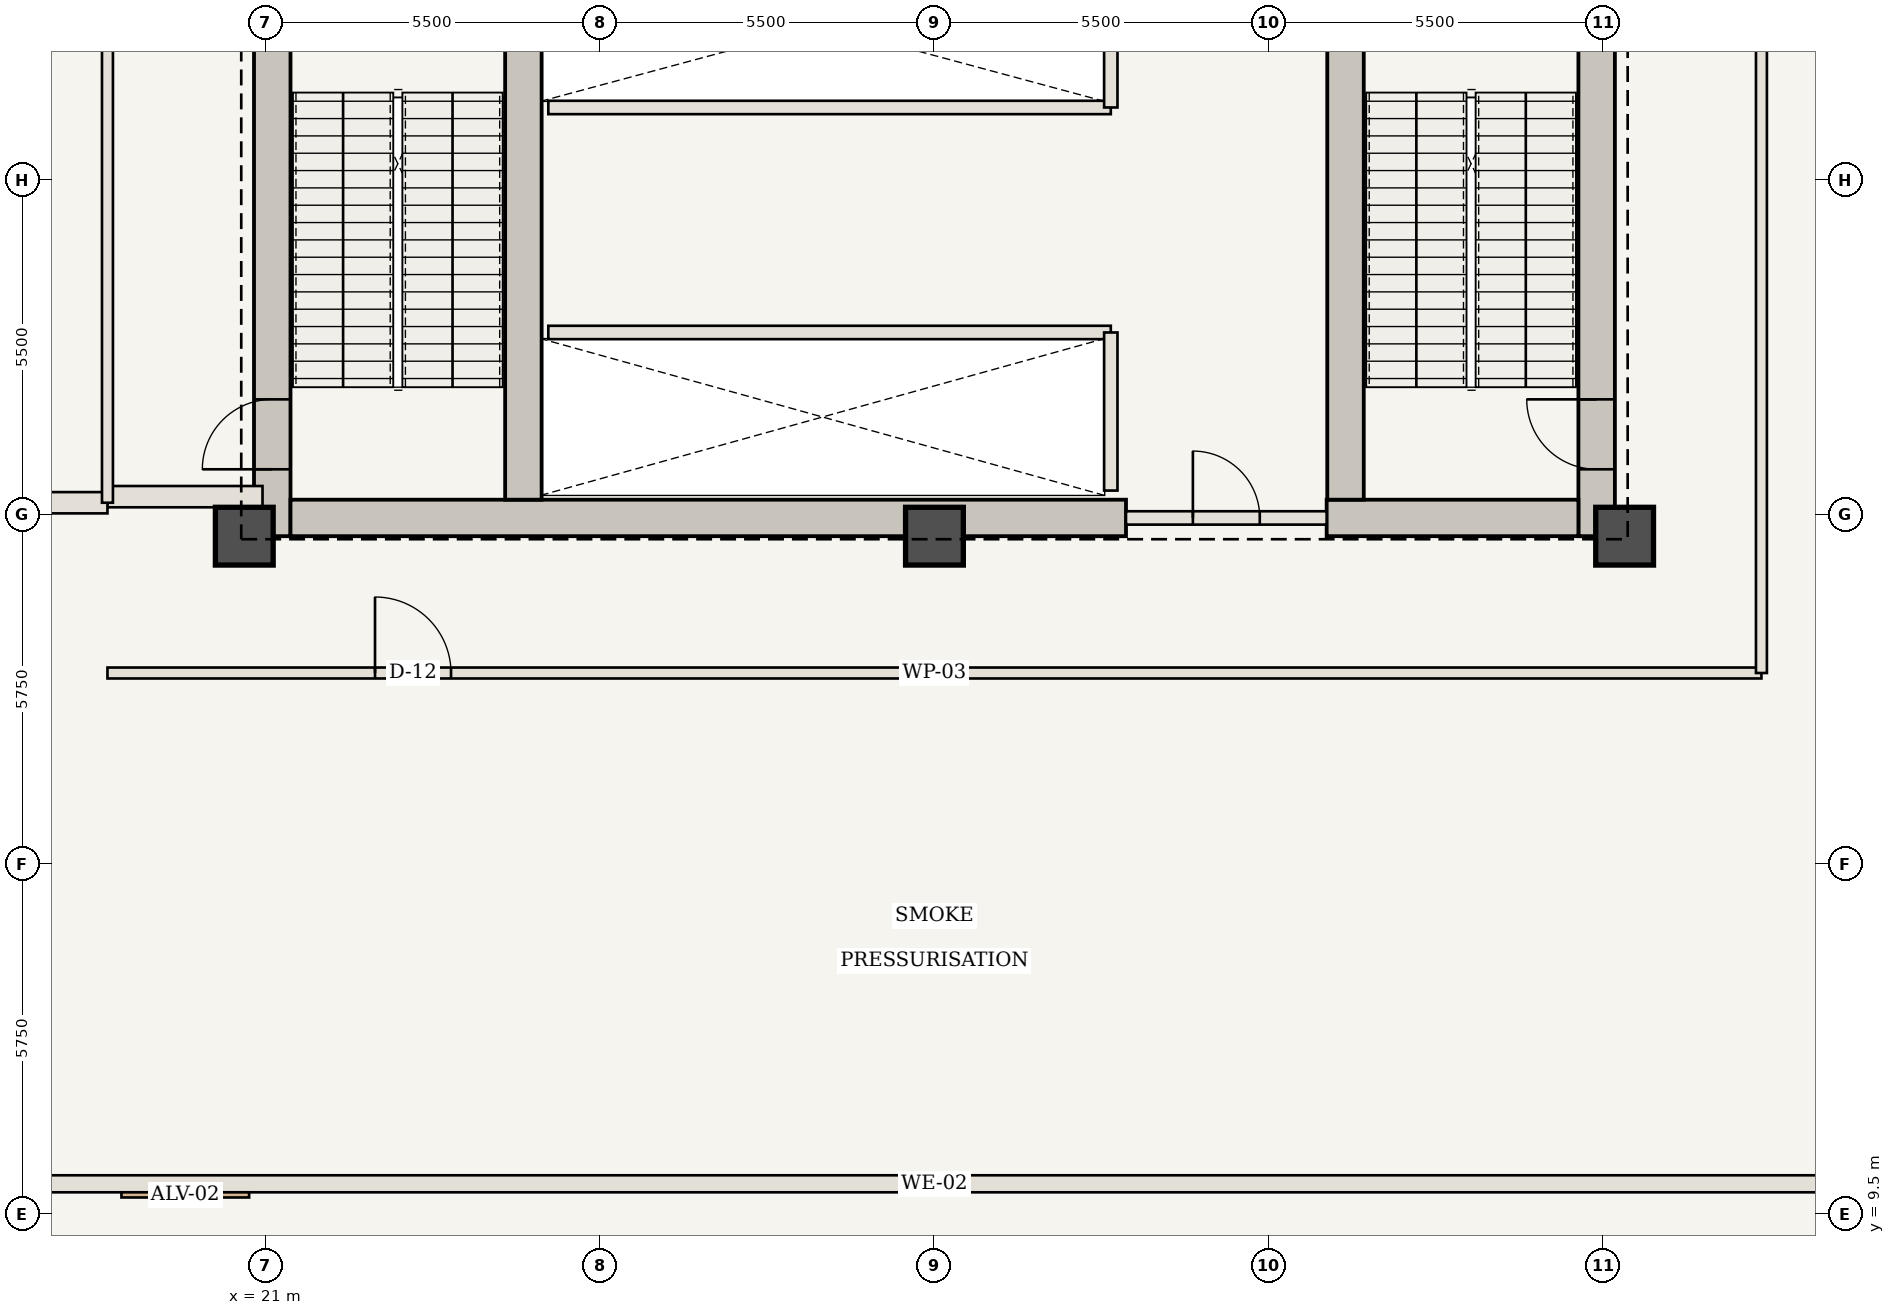
"""IFC4 building model, lengths in metres.
Left out: names, types, materials, properties, quantities, classifications, styles, units other than length and angle.
Written with IfcOpenShell. Run it as: python <this file> out.ifc"""

import sys

from ifc_helpers import new_model, si_unit, direction, frame, frame_2d, origin, origin_2d, place, context, subcontext, project, spatial, rectangle, extrude, element, fill, save


model = new_model("IFC4")
c1 = context("Model", 3, precision=1e-05, world=origin(), true_north=direction((0.0, 1.0)))
c2 = subcontext(c1, "Body", "Model", "MODEL_VIEW")
j1 = project(units=[si_unit("LENGTHUNIT", "METRE"), si_unit("PLANEANGLEUNIT", "RADIAN")], contexts=[c1])
p1 = place(None, origin())
s1 = spatial("IfcSite", under=j1, at=p1, CompositionType="ELEMENT")
p2 = place(p1, origin())
s2 = spatial("IfcBuilding", under=s1, at=p2, CompositionType="ELEMENT")
p3 = place(p2, frame((0.0, 0.0, 176.05)))
s3 = spatial("IfcBuildingStorey", under=s2, at=p3, CompositionType="ELEMENT", Elevation=176.05)
p4 = place(p3, frame((21.11, 20.65, 0.0), z_axis=(0.0, 0.0, 1.0), x_axis=(0.0, 1.0, 0.0)))
e1 = element("IfcWall", 1, at=p4, inside=s3, PredefinedType="SHEAR", context=c2, shape_type="SweptSolid", body=[
    extrude(rectangle(XDim=9.95, YDim=0.6, at=frame_2d((4.975, 0.0))), origin(), (0.0, 0.0, 1.0), 6.3),
])
p5 = place(p4, frame((1.1, 0.0, 0.0)))
e2 = element("IfcOpeningElement", 2, at=p5, cuts=e1, PredefinedType="OPENING", context=c2, shape_type="SweptSolid", body=[
    extrude(rectangle(XDim=1.15, YDim=2.15, at=frame_2d((0.575, 1.075))), frame((0.0, 0.31, 0.0), z_axis=(0.0, -1.0, 0.0), x_axis=(1.0, 0.0, 0.0)), (0.0, 0.0, 1.0), 0.62),
])
p6 = place(p3, frame((42.89, 20.65, 0.0), z_axis=(0.0, 0.0, 1.0), x_axis=(0.0, 1.0, 0.0)))
e3 = element("IfcWall", 3, at=p6, inside=s3, PredefinedType="SHEAR", context=c2, shape_type="SweptSolid", body=[
    extrude(rectangle(XDim=9.95, YDim=0.6, at=frame_2d((4.975, 0.0))), origin(), (0.0, 0.0, 1.0), 6.3),
])
p7 = place(p6, frame((1.1, 0.0, 0.0)))
e4 = element("IfcOpeningElement", 4, at=p7, cuts=e3, PredefinedType="OPENING", context=c2, shape_type="SweptSolid", body=[
    extrude(rectangle(XDim=1.15, YDim=2.15, at=frame_2d((0.575, 1.075))), frame((0.0, 0.31, 0.0), z_axis=(0.0, -1.0, 0.0), x_axis=(1.0, 0.0, 0.0)), (0.0, 0.0, 1.0), 0.62),
])
p8 = place(p3, frame((21.41, 20.95, 0.0), z_axis=(0.0, 0.0, 1.0), x_axis=(1.0, 0.0, 0.0)))
e5 = element("IfcWall", 5, at=p8, inside=s3, PredefinedType="SHEAR", context=c2, shape_type="SweptSolid", body=[
    extrude(rectangle(XDim=13.74, YDim=0.6, at=frame_2d((6.87, 0.0))), origin(), (0.0, 0.0, 1.0), 6.3),
])
p9 = place(p3, frame((38.45, 20.95, 0.0), z_axis=(0.0, 0.0, 1.0), x_axis=(1.0, 0.0, 0.0)))
e6 = element("IfcWall", 6, at=p9, inside=s3, PredefinedType="SHEAR", context=c2, shape_type="SweptSolid", body=[
    extrude(rectangle(XDim=4.14, YDim=0.6, at=frame_2d((2.07, 0.0))), origin(), (0.0, 0.0, 1.0), 6.3),
])
for number, where, z_axis, x_axis in (
    (7, (25.24, 21.25, 0.0), (0.0, 0.0, 1.0), (0.0, 1.0, 0.0)),
    (8, (38.76, 21.25, 0.0), (0.0, 0.0, 1.0), (0.0, 1.0, 0.0)),
):
    element("IfcWall", number, at=place(p3, frame(where, z_axis=z_axis, x_axis=x_axis)), inside=s3, PredefinedType="SHEAR", context=c2, shape_type="SweptSolid", body=[
        extrude(rectangle(XDim=9.35, YDim=0.6, at=frame_2d((4.675, 0.0))), origin(), (0.0, 0.0, 1.0), 6.3),
    ])
for number, where, z_axis, x_axis in (
    (9, (20.65, 20.65, 0.0), (0.0, 0.0, 1.0), (1.0, 0.0, 0.0)),
    (10, (32.0, 20.65, 0.0), (0.0, 0.0, 1.0), (1.0, 0.0, 0.0)),
    (11, (43.35, 20.65, 0.0), (0.0, 0.0, 1.0), (1.0, 0.0, 0.0)),
):
    element("IfcColumn", number, at=place(p3, frame(where, z_axis=z_axis, x_axis=x_axis)), inside=s3, PredefinedType="COLUMN", context=c2, shape_type="SweptSolid", body=[
        extrude(rectangle(XDim=0.95, YDim=0.95, at=origin_2d()), origin(), (0.0, 0.0, 1.0), 5.88),
    ])
p10 = place(p3, frame((35.15, 20.95, 0.0), z_axis=(0.0, 0.0, 1.0), x_axis=(1.0, 0.0, 0.0)))
e12 = element("IfcWall", 12, at=p10, inside=s3, PredefinedType="STANDARD", context=c2, shape_type="SweptSolid", body=[
    extrude(rectangle(XDim=3.3, YDim=0.22, at=frame_2d((1.65, 0.0))), origin(), (0.0, 0.0, 1.0), 5.88),
])
p11 = place(p10, frame((1.1, 0.0, 0.0)))
e13 = element("IfcOpeningElement", 13, at=p11, cuts=e12, PredefinedType="OPENING", context=c2, shape_type="SweptSolid", body=[
    extrude(rectangle(XDim=1.1, YDim=2.15, at=frame_2d((0.55, 1.075))), frame((0.0, 0.12, 0.0), z_axis=(0.0, -1.0, 0.0), x_axis=(1.0, 0.0, 0.0)), (0.0, 0.0, 1.0), 0.24),
])
p12 = place(p3, frame((25.65, 24.0, 0.0), z_axis=(0.0, 0.0, 1.0), x_axis=(1.0, 0.0, 0.0)))
e14 = element("IfcWall", 14, at=p12, inside=s3, PredefinedType="STANDARD", context=c2, shape_type="SweptSolid", body=[
    extrude(rectangle(XDim=9.25, YDim=0.22, at=frame_2d((4.625, 0.0))), origin(), (0.0, 0.0, 1.0), 5.88),
])
p13 = place(p3, frame((34.9, 21.4, 0.0), z_axis=(0.0, 0.0, 1.0), x_axis=(0.0, 1.0, 0.0)))
e15 = element("IfcWall", 15, at=p13, inside=s3, PredefinedType="STANDARD", context=c2, shape_type="SweptSolid", body=[
    extrude(rectangle(XDim=2.6, YDim=0.22, at=frame_2d((1.3, 0.0))), origin(), (0.0, 0.0, 1.0), 5.88),
])
p14 = place(p3, frame((25.65, 27.7, 0.0), z_axis=(0.0, 0.0, 1.0), x_axis=(1.0, 0.0, 0.0)))
e16 = element("IfcWall", 16, at=p14, inside=s3, PredefinedType="STANDARD", context=c2, shape_type="SweptSolid", body=[
    extrude(rectangle(XDim=9.25, YDim=0.22, at=frame_2d((4.625, 0.0))), origin(), (0.0, 0.0, 1.0), 5.88),
])
p15 = place(p3, frame((34.9, 27.7, 0.0), z_axis=(0.0, 0.0, 1.0), x_axis=(0.0, 1.0, 0.0)))
e17 = element("IfcWall", 17, at=p15, inside=s3, PredefinedType="STANDARD", context=c2, shape_type="SweptSolid", body=[
    extrude(rectangle(XDim=2.7, YDim=0.22, at=frame_2d((1.35, 0.0))), origin(), (0.0, 0.0, 1.0), 5.88),
])
p16 = place(p3, frame((18.4, 21.3, 0.0), z_axis=(0.0, 0.0, 1.0), x_axis=(1.0, 0.0, 0.0)))
e18 = element("IfcWall", 18, at=p16, inside=s3, PredefinedType="STANDARD", context=c2, shape_type="SweptSolid", body=[
    extrude(rectangle(XDim=2.55, YDim=0.35, at=frame_2d((1.275, 0.0))), origin(), (0.0, 0.0, 1.0), 3.908),
])
p17 = place(p3, frame((18.4, 18.4, 0.0), z_axis=(0.0, 0.0, 1.0), x_axis=(1.0, 0.0, 0.0)))
e19 = element("IfcWall", 19, at=p17, inside=s3, PredefinedType="STANDARD", context=c2, shape_type="SweptSolid", body=[
    extrude(rectangle(XDim=27.2, YDim=0.18, at=frame_2d((13.6, 0.0))), origin(), (0.0, 0.0, 1.0), 5.88),
])
p18 = place(p17, frame((4.4, 0.0, 0.0)))
e20 = element("IfcOpeningElement", 20, at=p18, cuts=e19, PredefinedType="OPENING", context=c2, shape_type="SweptSolid", body=[
    extrude(rectangle(XDim=1.25, YDim=2.2, at=frame_2d((0.625, 1.1))), frame((0.0, 0.1, 0.0), z_axis=(0.0, -1.0, 0.0), x_axis=(1.0, 0.0, 0.0)), (0.0, 0.0, 1.0), 0.2),
])
p19 = place(p3, frame((10.05, 21.2, 0.0), z_axis=(0.0, 0.0, 1.0), x_axis=(1.0, 0.0, 0.0)))
e21 = element("IfcWall", 21, at=p19, inside=s3, PredefinedType="STANDARD", context=c2, shape_type="SweptSolid", body=[
    extrude(rectangle(XDim=8.35, YDim=0.35, at=frame_2d((4.175, 0.0))), origin(), (0.0, 0.0, 1.0), 3.908),
])
p20 = place(p3, frame((18.4, 21.2, 0.0), z_axis=(0.0, 0.0, 1.0), x_axis=(0.0, 1.0, 0.0)))
e22 = element("IfcWall", 22, at=p20, inside=s3, PredefinedType="STANDARD", context=c2, shape_type="SweptSolid", body=[
    extrude(rectangle(XDim=21.6, YDim=0.18, at=frame_2d((10.8, 0.0))), origin(), (0.0, 0.0, 1.0), 5.88),
])
p21 = place(p20, frame((11.75, 0.0, 0.0)))
e23 = element("IfcOpeningElement", 23, at=p21, cuts=e22, PredefinedType="OPENING", context=c2, shape_type="SweptSolid", body=[
    extrude(rectangle(XDim=1.1, YDim=2.15, at=frame_2d((0.55, 1.075))), frame((0.0, 0.1, 0.0), z_axis=(0.0, -1.0, 0.0), x_axis=(1.0, 0.0, 0.0)), (0.0, 0.0, 1.0), 0.2),
])
p22 = place(p3, frame((45.6, 18.4, 0.0), z_axis=(0.0, 0.0, 1.0), x_axis=(0.0, 1.0, 0.0)))
e24 = element("IfcWall", 24, at=p22, inside=s3, PredefinedType="STANDARD", context=c2, shape_type="SweptSolid", body=[
    extrude(rectangle(XDim=27.2, YDim=0.18, at=frame_2d((13.6, 0.0))), origin(), (0.0, 0.0, 1.0), 5.88),
])
p23 = place(p22, frame((14.55, 0.0, 0.0)))
e25 = element("IfcOpeningElement", 25, at=p23, cuts=e24, PredefinedType="OPENING", context=c2, shape_type="SweptSolid", body=[
    extrude(rectangle(XDim=1.25, YDim=2.2, at=frame_2d((0.625, 1.1))), frame((0.0, 0.1, 0.0), z_axis=(0.0, -1.0, 0.0), x_axis=(1.0, 0.0, 0.0)), (0.0, 0.0, 1.0), 0.2),
])
p24 = place(p3, frame((54.0, 10.0, 0.0), z_axis=(0.0, 0.0, 1.0), x_axis=(-1.0, 0.0, 0.0)))
e26 = element("IfcWall", 26, at=p24, inside=s3, PredefinedType="USERDEFINED", context=c2, shape_type="SweptSolid", body=[
    extrude(rectangle(XDim=44.0, YDim=0.28, at=frame_2d((22.0, 0.0))), origin(), (0.0, 0.0, 1.0), 3.88),
])
p25 = place(p5, origin())
e27 = element("IfcDoor", 27, at=p25, inside=s3, OperationType="SINGLE_SWING_LEFT", PredefinedType="DOOR", context=c2, shape_type="SweptSolid", body=[
    extrude(rectangle(XDim=1.15, YDim=2.15, at=frame_2d((0.575, 1.075))), frame((0.0, 0.025, 0.0), z_axis=(0.0, -1.0, 0.0), x_axis=(1.0, 0.0, 0.0)), (0.0, 0.0, 1.0), 0.05),
])
fill(e2, e27)
p26 = place(p7, origin())
e28 = element("IfcDoor", 28, at=p26, inside=s3, OperationType="SINGLE_SWING_RIGHT", PredefinedType="DOOR", context=c2, shape_type="SweptSolid", body=[
    extrude(rectangle(XDim=1.15, YDim=2.15, at=frame_2d((0.575, 1.075))), frame((0.0, 0.025, 0.0), z_axis=(0.0, -1.0, 0.0), x_axis=(1.0, 0.0, 0.0)), (0.0, 0.0, 1.0), 0.05),
])
fill(e4, e28)
p27 = place(p11, origin())
e29 = element("IfcDoor", 29, at=p27, inside=s3, OperationType="SINGLE_SWING_LEFT", PredefinedType="DOOR", context=c2, shape_type="SweptSolid", body=[
    extrude(rectangle(XDim=1.1, YDim=2.15, at=frame_2d((0.55, 1.075))), frame((0.0, 0.025, 0.0), z_axis=(0.0, -1.0, 0.0), x_axis=(1.0, 0.0, 0.0)), (0.0, 0.0, 1.0), 0.05),
])
fill(e13, e29)
p28 = place(p18, origin())
e30 = element("IfcDoor", 30, at=p28, inside=s3, OperationType="SINGLE_SWING_LEFT", PredefinedType="DOOR", context=c2, shape_type="SweptSolid", body=[
    extrude(rectangle(XDim=1.25, YDim=2.2, at=frame_2d((0.625, 1.1))), frame((0.0, 0.025, 0.0), z_axis=(0.0, -1.0, 0.0), x_axis=(1.0, 0.0, 0.0)), (0.0, 0.0, 1.0), 0.05),
])
fill(e20, e30)
save(model, sys.argv[1])
